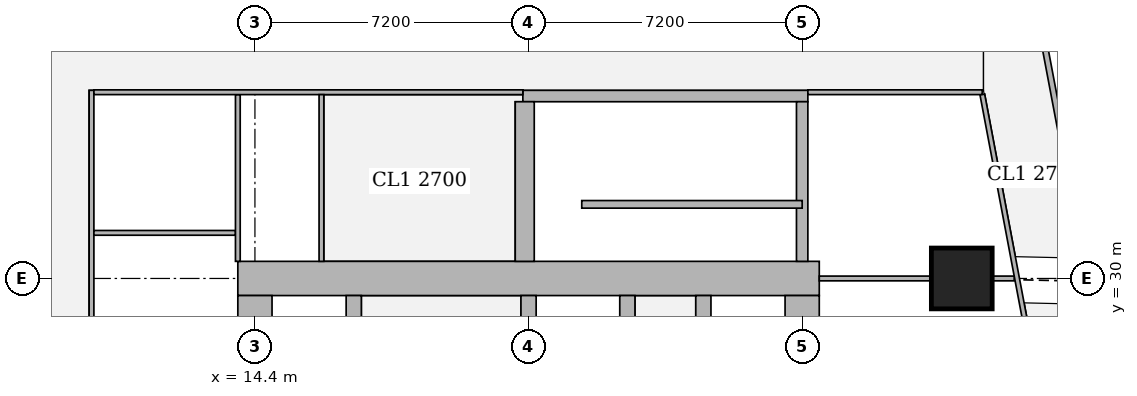
"""IFC4 building model, lengths in metres.
Left out: names, types, materials, properties, quantities, classifications, styles, units other than length and angle.
Written with IfcOpenShell. Run it as: python <this file> out.ifc"""

import sys

from ifc_helpers import new_model, si_unit, direction, frame, frame_2d, origin, origin_2d, place, context, subcontext, project, spatial, rectangle, extrude, element, fill, save


model = new_model("IFC4")
c1 = context("Model", 3, precision=1e-05, world=origin(), true_north=direction((0.0, 1.0)))
c2 = subcontext(c1, "Body", "Model", "MODEL_VIEW")
j1 = project(units=[si_unit("LENGTHUNIT", "METRE"), si_unit("PLANEANGLEUNIT", "RADIAN")], contexts=[c1])
p1 = place(None, origin())
s1 = spatial("IfcSite", under=j1, at=p1, CompositionType="ELEMENT")
p2 = place(p1, origin())
s2 = spatial("IfcBuilding", under=s1, at=p2, CompositionType="ELEMENT")
p3 = place(p2, frame((0.0, 0.0, 100.4)))
s3 = spatial("IfcBuildingStorey", under=s2, at=p3, CompositionType="ELEMENT", Elevation=100.4)
p4 = place(p3, frame((33.0, 30.0, 0.0), z_axis=(0.0, 0.0, 1.0), x_axis=(1.0, 0.0, 0.0)))
e1 = element("IfcColumn", 1, at=p4, inside=s3, PredefinedType="COLUMN", context=c2, shape_type="SweptSolid", body=[
    extrude(rectangle(XDim=1.6, YDim=1.6, at=origin_2d()), origin(), (0.0, 0.0, 1.0), 3.75),
])
p5 = place(p3, frame((13.95, 30.0, 0.0), z_axis=(0.0, 0.0, 1.0), x_axis=(1.0, 0.0, 0.0)))
e2 = element("IfcWall", 2, at=p5, inside=s3, PredefinedType="SHEAR", context=c2, shape_type="SweptSolid", body=[
    extrude(rectangle(XDim=15.3, YDim=0.9, at=frame_2d((7.65, 0.0))), origin(), (0.0, 0.0, 1.0), 3.75),
])
p6 = place(p5, frame((4.45, 0.0, 0.0)))
e3 = element("IfcOpeningElement", 3, at=p6, cuts=e2, PredefinedType="OPENING", context=c2, shape_type="SweptSolid", body=[
    extrude(rectangle(XDim=1.8, YDim=2.1, at=frame_2d((0.9, 1.05))), frame((0.0, 0.46, 0.0), z_axis=(0.0, -1.0, 0.0), x_axis=(1.0, 0.0, 0.0)), (0.0, 0.0, 1.0), 0.92),
])
p7 = place(p5, frame((10.7, 0.0, 0.0)))
e4 = element("IfcOpeningElement", 4, at=p7, cuts=e2, PredefinedType="OPENING", context=c2, shape_type="SweptSolid", body=[
    extrude(rectangle(XDim=1.1, YDim=2.1, at=frame_2d((0.55, 1.05))), frame((0.0, 0.46, 0.0), z_axis=(0.0, -1.0, 0.0), x_axis=(1.0, 0.0, 0.0)), (0.0, 0.0, 1.0), 0.92),
])
for number, where, z_axis, x_axis in (
    (5, (14.4, 15.45, 0.0), (0.0, 0.0, 1.0), (0.0, 1.0, 0.0)),
    (6, (28.8, 15.45, 0.0), (0.0, 0.0, 1.0), (0.0, 1.0, 0.0)),
):
    element("IfcWall", number, at=place(p3, frame(where, z_axis=z_axis, x_axis=x_axis)), inside=s3, PredefinedType="SHEAR", context=c2, shape_type="SweptSolid", body=[
        extrude(rectangle(XDim=14.1, YDim=0.9, at=frame_2d((7.05, 0.0))), origin(), (0.0, 0.0, 1.0), 3.75),
    ])
p8 = place(p3, frame((17.0, 15.45, 0.0), z_axis=(0.0, 0.0, 1.0), x_axis=(0.0, 1.0, 0.0)))
e7 = element("IfcWall", 7, at=p8, inside=s3, PredefinedType="SHEAR", context=c2, shape_type="SweptSolid", body=[
    extrude(rectangle(XDim=14.1, YDim=0.4, at=frame_2d((7.05, 0.0))), origin(), (0.0, 0.0, 1.0), 3.75),
])
p9 = place(p8, frame((0.875, 0.0, 0.0)))
e8 = element("IfcOpeningElement", 8, at=p9, cuts=e7, PredefinedType="OPENING", context=c2, shape_type="SweptSolid", body=[
    extrude(rectangle(XDim=1.1, YDim=2.1, at=frame_2d((0.55, 1.05))), frame((0.0, 0.21, 0.0), z_axis=(0.0, -1.0, 0.0), x_axis=(1.0, 0.0, 0.0)), (0.0, 0.0, 1.0), 0.42),
])
p10 = place(p8, frame((4.625, 0.0, 0.0)))
e9 = element("IfcOpeningElement", 9, at=p10, cuts=e7, PredefinedType="OPENING", context=c2, shape_type="SweptSolid", body=[
    extrude(rectangle(XDim=1.1, YDim=2.1, at=frame_2d((0.55, 1.05))), frame((0.0, 0.21, 0.0), z_axis=(0.0, -1.0, 0.0), x_axis=(1.0, 0.0, 0.0)), (0.0, 0.0, 1.0), 0.42),
])
p11 = place(p8, frame((8.375, 0.0, 0.0)))
e10 = element("IfcOpeningElement", 10, at=p11, cuts=e7, PredefinedType="OPENING", context=c2, shape_type="SweptSolid", body=[
    extrude(rectangle(XDim=1.1, YDim=2.1, at=frame_2d((0.55, 1.05))), frame((0.0, 0.21, 0.0), z_axis=(0.0, -1.0, 0.0), x_axis=(1.0, 0.0, 0.0)), (0.0, 0.0, 1.0), 0.42),
])
p12 = place(p8, frame((12.125, 0.0, 0.0)))
e11 = element("IfcOpeningElement", 11, at=p12, cuts=e7, PredefinedType="OPENING", context=c2, shape_type="SweptSolid", body=[
    extrude(rectangle(XDim=1.1, YDim=2.1, at=frame_2d((0.55, 1.05))), frame((0.0, 0.21, 0.0), z_axis=(0.0, -1.0, 0.0), x_axis=(1.0, 0.0, 0.0)), (0.0, 0.0, 1.0), 0.42),
])
for number, where, z_axis, x_axis in (
    (12, (21.6, 15.45, 0.0), (0.0, 0.0, 1.0), (0.0, 1.0, 0.0)),
    (13, (24.2, 15.45, 0.0), (0.0, 0.0, 1.0), (0.0, 1.0, 0.0)),
):
    element("IfcWall", number, at=place(p3, frame(where, z_axis=z_axis, x_axis=x_axis)), inside=s3, PredefinedType="SHEAR", context=c2, shape_type="SweptSolid", body=[
        extrude(rectangle(XDim=14.1, YDim=0.4, at=frame_2d((7.05, 0.0))), origin(), (0.0, 0.0, 1.0), 3.75),
    ])
p13 = place(p3, frame((26.2, 26.45, 0.0), z_axis=(0.0, 0.0, 1.0), x_axis=(0.0, 1.0, 0.0)))
e14 = element("IfcWall", 14, at=p13, inside=s3, PredefinedType="SHEAR", context=c2, shape_type="SweptSolid", body=[
    extrude(rectangle(XDim=3.1, YDim=0.4, at=frame_2d((1.55, 0.0))), origin(), (0.0, 0.0, 1.0), 3.75),
])
p14 = place(p13, frame((1.075, 0.0, 0.0)))
e15 = element("IfcOpeningElement", 15, at=p14, cuts=e14, PredefinedType="OPENING", context=c2, shape_type="SweptSolid", body=[
    extrude(rectangle(XDim=1.2, YDim=2.1, at=frame_2d((0.6, 1.05))), frame((0.0, 0.21, 0.0), z_axis=(0.0, -1.0, 0.0), x_axis=(1.0, 0.0, 0.0)), (0.0, 0.0, 1.0), 0.42),
])
p15 = place(p3, frame((21.45, 34.8, 0.0), z_axis=(0.0, 0.0, 1.0), x_axis=(1.0, 0.0, 0.0)))
e16 = element("IfcWall", 16, at=p15, inside=s3, PredefinedType="SHEAR", context=c2, shape_type="SweptSolid", body=[
    extrude(rectangle(XDim=7.5, YDim=0.3, at=frame_2d((3.75, 0.0))), origin(), (0.0, 0.0, 1.0), 3.75),
])
p16 = place(p15, frame((0.5, 0.0, 0.0)))
e17 = element("IfcOpeningElement", 17, at=p16, cuts=e16, PredefinedType="OPENING", context=c2, shape_type="SweptSolid", body=[
    extrude(rectangle(XDim=1.1, YDim=2.1, at=frame_2d((0.55, 1.05))), frame((0.0, 0.16, 0.0), z_axis=(0.0, -1.0, 0.0), x_axis=(1.0, 0.0, 0.0)), (0.0, 0.0, 1.0), 0.32),
])
p17 = place(p3, frame((21.5, 30.45, 0.0), z_axis=(0.0, 0.0, 1.0), x_axis=(0.0, 1.0, 0.0)))
e18 = element("IfcWall", 18, at=p17, inside=s3, PredefinedType="SHEAR", context=c2, shape_type="SweptSolid", body=[
    extrude(rectangle(XDim=4.2, YDim=0.5, at=frame_2d((2.1, 0.0))), origin(), (0.0, 0.0, 1.0), 3.75),
])
p18 = place(p3, frame((28.8, 30.45, 0.0), z_axis=(0.0, 0.0, 1.0), x_axis=(0.0, 1.0, 0.0)))
e19 = element("IfcWall", 19, at=p18, inside=s3, PredefinedType="SHEAR", context=c2, shape_type="SweptSolid", body=[
    extrude(rectangle(XDim=4.2, YDim=0.3, at=frame_2d((2.1, 0.0))), origin(), (0.0, 0.0, 1.0), 3.75),
])
p19 = place(p3, frame((33.382, 45.65, 0.0), z_axis=(0.0, 0.0, 1.0), x_axis=(0.185593544777, -0.982626600565, 0.0)))
e20 = element("IfcWall", 20, at=p19, inside=s3, PredefinedType="SOLIDWALL", context=c2, shape_type="SweptSolid", body=[
    extrude(rectangle(XDim=47.118, YDim=0.15, at=frame_2d((23.559, 0.0))), origin(), (0.0, 0.0, 1.0), 2.2),
])
p20 = place(p19, frame((10.662, 0.0, 0.0)))
e21 = element("IfcOpeningElement", 21, at=p20, cuts=e20, PredefinedType="OPENING", context=c2, shape_type="SweptSolid", body=[
    extrude(rectangle(XDim=1.0, YDim=2.1, at=frame_2d((0.5, 1.05))), frame((0.0, 0.085, 0.0), z_axis=(0.0, -1.0, 0.0), x_axis=(1.0, 0.0, 0.0)), (0.0, 0.0, 1.0), 0.17),
])
p21 = place(p19, frame((15.237, 0.0, 0.0)))
e22 = element("IfcOpeningElement", 22, at=p21, cuts=e20, PredefinedType="OPENING", context=c2, shape_type="SweptSolid", body=[
    extrude(rectangle(XDim=1.0, YDim=2.1, at=frame_2d((0.5, 1.05))), frame((0.0, 0.085, 0.0), z_axis=(0.0, -1.0, 0.0), x_axis=(1.0, 0.0, 0.0)), (0.0, 0.0, 1.0), 0.17),
])
p22 = place(p19, frame((27.341, 0.0, 0.0)))
e23 = element("IfcOpeningElement", 23, at=p22, cuts=e20, PredefinedType="OPENING", context=c2, shape_type="SweptSolid", body=[
    extrude(rectangle(XDim=1.0, YDim=2.1, at=frame_2d((0.5, 1.05))), frame((0.0, 0.085, 0.0), z_axis=(0.0, -1.0, 0.0), x_axis=(1.0, 0.0, 0.0)), (0.0, 0.0, 1.0), 0.17),
])
p23 = place(p19, frame((33.833, 0.0, 0.0)))
e24 = element("IfcOpeningElement", 24, at=p23, cuts=e20, PredefinedType="OPENING", context=c2, shape_type="SweptSolid", body=[
    extrude(rectangle(XDim=1.0, YDim=2.1, at=frame_2d((0.5, 1.05))), frame((0.0, 0.085, 0.0), z_axis=(0.0, -1.0, 0.0), x_axis=(1.0, 0.0, 0.0)), (0.0, 0.0, 1.0), 0.17),
])
p24 = place(p3, frame((10.1, 28.5, 0.0), z_axis=(0.0, 0.0, 1.0), x_axis=(0.0, 1.0, 0.0)))
e25 = element("IfcWall", 25, at=p24, inside=s3, PredefinedType="PARTITIONING", context=c2, shape_type="SweptSolid", body=[
    extrude(rectangle(XDim=6.45, YDim=0.125, at=frame_2d((3.225, 0.0))), origin(), (0.0, 0.0, 1.0), 3.5),
])
p25 = place(p24, frame((0.85, 0.0, 0.0)))
e26 = element("IfcOpeningElement", 26, at=p25, cuts=e25, PredefinedType="OPENING", context=c2, shape_type="SweptSolid", body=[
    extrude(rectangle(XDim=1.0, YDim=2.1, at=frame_2d((0.5, 1.05))), frame((0.0, 0.073, 0.0), z_axis=(0.0, -1.0, 0.0), x_axis=(1.0, 0.0, 0.0)), (0.0, 0.0, 1.0), 0.145),
])
p26 = place(p24, frame((4.075, 0.0, 0.0)))
e27 = element("IfcOpeningElement", 27, at=p26, cuts=e25, PredefinedType="OPENING", context=c2, shape_type="SweptSolid", body=[
    extrude(rectangle(XDim=1.0, YDim=2.1, at=frame_2d((0.5, 1.05))), frame((0.0, 0.073, 0.0), z_axis=(0.0, -1.0, 0.0), x_axis=(1.0, 0.0, 0.0)), (0.0, 0.0, 1.0), 0.145),
])
p27 = place(p3, frame((10.163, 31.2, 0.0), z_axis=(0.0, 0.0, 1.0), x_axis=(1.0, 0.0, 0.0)))
e28 = element("IfcWall", 28, at=p27, inside=s3, PredefinedType="PARTITIONING", context=c2, shape_type="SweptSolid", body=[
    extrude(rectangle(XDim=3.725, YDim=0.125, at=frame_2d((1.862, 0.0))), origin(), (0.0, 0.0, 1.0), 3.5),
])
p28 = place(p3, frame((13.95, 30.45, 0.0), z_axis=(0.0, 0.0, 1.0), x_axis=(0.0, 1.0, 0.0)))
e29 = element("IfcWall", 29, at=p28, inside=s3, PredefinedType="PARTITIONING", context=c2, shape_type="SweptSolid", body=[
    extrude(rectangle(XDim=4.387, YDim=0.125, at=frame_2d((2.193, 0.0))), origin(), (0.0, 0.0, 1.0), 3.5),
])
p29 = place(p3, frame((10.163, 34.9, 0.0), z_axis=(0.0, 0.0, 1.0), x_axis=(1.0, 0.0, 0.0)))
e30 = element("IfcWall", 30, at=p29, inside=s3, PredefinedType="PARTITIONING", context=c2, shape_type="SweptSolid", body=[
    extrude(rectangle(XDim=11.287, YDim=0.125, at=frame_2d((5.644, 0.0))), origin(), (0.0, 0.0, 1.0), 3.5),
])
p30 = place(p29, frame((7.737, 0.0, 0.0)))
e31 = element("IfcOpeningElement", 31, at=p30, cuts=e30, PredefinedType="OPENING", context=c2, shape_type="SweptSolid", body=[
    extrude(rectangle(XDim=1.8, YDim=2.1, at=frame_2d((0.9, 1.05))), frame((0.0, 0.073, 0.0), z_axis=(0.0, -1.0, 0.0), x_axis=(1.0, 0.0, 0.0)), (0.0, 0.0, 1.0), 0.145),
])
p31 = place(p3, frame((16.15, 30.45, 0.0), z_axis=(0.0, 0.0, 1.0), x_axis=(0.0, 1.0, 0.0)))
e32 = element("IfcWall", 32, at=p31, inside=s3, PredefinedType="PARTITIONING", context=c2, shape_type="SweptSolid", body=[
    extrude(rectangle(XDim=4.387, YDim=0.125, at=frame_2d((2.193, 0.0))), origin(), (0.0, 0.0, 1.0), 3.5),
])
p32 = place(p31, frame((1.75, 0.0, 0.0)))
e33 = element("IfcOpeningElement", 33, at=p32, cuts=e32, PredefinedType="OPENING", context=c2, shape_type="SweptSolid", body=[
    extrude(rectangle(XDim=1.0, YDim=2.1, at=frame_2d((0.5, 1.05))), frame((0.0, 0.073, 0.0), z_axis=(0.0, -1.0, 0.0), x_axis=(1.0, 0.0, 0.0)), (0.0, 0.0, 1.0), 0.145),
])
p33 = place(p3, frame((28.95, 34.9, 0.0), z_axis=(0.0, 0.0, 1.0), x_axis=(1.0, 0.0, 0.0)))
e34 = element("IfcWall", 34, at=p33, inside=s3, PredefinedType="PARTITIONING", context=c2, shape_type="SweptSolid", body=[
    extrude(rectangle(XDim=4.588, YDim=0.125, at=frame_2d((2.294, 0.0))), origin(), (0.0, 0.0, 1.0), 3.5),
])
p34 = place(p3, frame((38.202, 10.163, 0.0), z_axis=(0.0, 0.0, 1.0), x_axis=(-0.185610321132, 0.982623431783, 0.0)))
e35 = element("IfcWall", 35, at=p34, inside=s3, PredefinedType="PARTITIONING", context=c2, shape_type="SweptSolid", body=[
    extrude(rectangle(XDim=25.111, YDim=0.125, at=frame_2d((12.556, 0.0))), origin(), (0.0, 0.0, 1.0), 2.5),
])
p35 = place(p34, frame((0.708, 0.0, 0.0)))
e36 = element("IfcOpeningElement", 36, at=p35, cuts=e35, PredefinedType="OPENING", context=c2, shape_type="SweptSolid", body=[
    extrude(rectangle(XDim=1.0, YDim=2.1, at=frame_2d((0.5, 1.05))), frame((0.0, 0.073, 0.0), z_axis=(0.0, -1.0, 0.0), x_axis=(1.0, 0.0, 0.0)), (0.0, 0.0, 1.0), 0.145),
])
p36 = place(p34, frame((6.0, 0.0, 0.0)))
e37 = element("IfcOpeningElement", 37, at=p36, cuts=e35, PredefinedType="OPENING", context=c2, shape_type="SweptSolid", body=[
    extrude(rectangle(XDim=1.0, YDim=2.1, at=frame_2d((0.5, 1.05))), frame((0.0, 0.073, 0.0), z_axis=(0.0, -1.0, 0.0), x_axis=(1.0, 0.0, 0.0)), (0.0, 0.0, 1.0), 0.145),
])
p37 = place(p34, frame((13.378, 0.0, 0.0)))
e38 = element("IfcOpeningElement", 38, at=p37, cuts=e35, PredefinedType="OPENING", context=c2, shape_type="SweptSolid", body=[
    extrude(rectangle(XDim=1.0, YDim=2.1, at=frame_2d((0.5, 1.05))), frame((0.0, 0.073, 0.0), z_axis=(0.0, -1.0, 0.0), x_axis=(1.0, 0.0, 0.0)), (0.0, 0.0, 1.0), 0.145),
])
p38 = place(p34, frame((21.25, 0.0, 0.0)))
e39 = element("IfcOpeningElement", 39, at=p38, cuts=e35, PredefinedType="OPENING", context=c2, shape_type="SweptSolid", body=[
    extrude(rectangle(XDim=1.0, YDim=2.1, at=frame_2d((0.5, 1.05))), frame((0.0, 0.073, 0.0), z_axis=(0.0, -1.0, 0.0), x_axis=(1.0, 0.0, 0.0)), (0.0, 0.0, 1.0), 0.145),
])
p39 = place(p3, frame((29.25, 30.0, 0.0), z_axis=(0.0, 0.0, 1.0), x_axis=(1.0, 0.0, 0.0)))
e40 = element("IfcWall", 40, at=p39, inside=s3, PredefinedType="PARTITIONING", context=c2, shape_type="SweptSolid", body=[
    extrude(rectangle(XDim=2.949, YDim=0.125, at=frame_2d((1.475, 0.0))), origin(), (0.0, 0.0, 1.0), 3.5),
])
p40 = place(p3, frame((33.801, 30.0, 0.0), z_axis=(0.0, 0.0, 1.0), x_axis=(1.0, 0.0, 0.0)))
e41 = element("IfcWall", 41, at=p40, inside=s3, PredefinedType="PARTITIONING", context=c2, shape_type="SweptSolid", body=[
    extrude(rectangle(XDim=0.578, YDim=0.125, at=frame_2d((0.289, 0.0))), origin(), (0.0, 0.0, 1.0), 2.5),
])
p41 = place(p3, frame((23.0, 31.95, 0.0), z_axis=(0.0, 0.0, 1.0), x_axis=(1.0, 0.0, 0.0)))
e42 = element("IfcWall", 42, at=p41, inside=s3, PredefinedType="SHEAR", context=c2, shape_type="SweptSolid", body=[
    extrude(rectangle(XDim=5.8, YDim=0.2, at=frame_2d((2.9, 0.0))), origin(), (0.0, 0.0, 1.0), 3.75),
])
p42 = place(p20, origin())
e43 = element("IfcDoor", 43, at=p42, inside=s3, OperationType="SINGLE_SWING_RIGHT", PredefinedType="DOOR", context=c2, shape_type="SweptSolid", body=[
    extrude(rectangle(XDim=1.0, YDim=2.1, at=frame_2d((0.5, 1.05))), frame((0.0, 0.025, 0.0), z_axis=(0.0, -1.0, 0.0), x_axis=(1.0, 0.0, 0.0)), (0.0, 0.0, 1.0), 0.05),
])
fill(e21, e43)
p43 = place(p25, origin())
e44 = element("IfcDoor", 44, at=p43, inside=s3, OperationType="SINGLE_SWING_RIGHT", PredefinedType="DOOR", context=c2, shape_type="SweptSolid", body=[
    extrude(rectangle(XDim=1.0, YDim=2.1, at=frame_2d((0.5, 1.05))), frame((0.0, 0.025, 0.0), z_axis=(0.0, -1.0, 0.0), x_axis=(1.0, 0.0, 0.0)), (0.0, 0.0, 1.0), 0.05),
])
fill(e26, e44)
p44 = place(p26, origin())
e45 = element("IfcDoor", 45, at=p44, inside=s3, OperationType="SINGLE_SWING_LEFT", PredefinedType="DOOR", context=c2, shape_type="SweptSolid", body=[
    extrude(rectangle(XDim=1.0, YDim=2.1, at=frame_2d((0.5, 1.05))), frame((0.0, 0.025, 0.0), z_axis=(0.0, -1.0, 0.0), x_axis=(1.0, 0.0, 0.0)), (0.0, 0.0, 1.0), 0.05),
])
fill(e27, e45)
p45 = place(p32, origin())
e46 = element("IfcDoor", 46, at=p45, inside=s3, OperationType="SINGLE_SWING_RIGHT", PredefinedType="DOOR", context=c2, shape_type="SweptSolid", body=[
    extrude(rectangle(XDim=1.0, YDim=2.1, at=frame_2d((0.5, 1.05))), frame((0.0, 0.025, 0.0), z_axis=(0.0, -1.0, 0.0), x_axis=(1.0, 0.0, 0.0)), (0.0, 0.0, 1.0), 0.05),
])
fill(e33, e46)
p46 = place(p30, origin())
e47 = element("IfcDoor", 47, at=p46, inside=s3, OperationType="DOUBLE_DOOR_SINGLE_SWING", PredefinedType="DOOR", context=c2, shape_type="SweptSolid", body=[
    extrude(rectangle(XDim=1.8, YDim=2.1, at=frame_2d((0.9, 1.05))), frame((0.0, 0.025, 0.0), z_axis=(0.0, -1.0, 0.0), x_axis=(1.0, 0.0, 0.0)), (0.0, 0.0, 1.0), 0.05),
])
fill(e31, e47)
p47 = place(p38, origin())
e48 = element("IfcDoor", 48, at=p47, inside=s3, OperationType="SINGLE_SWING_LEFT", PredefinedType="DOOR", context=c2, shape_type="SweptSolid", body=[
    extrude(rectangle(XDim=1.0, YDim=2.1, at=frame_2d((0.5, 1.05))), frame((0.0, 0.025, 0.0), z_axis=(0.0, -1.0, 0.0), x_axis=(1.0, 0.0, 0.0)), (0.0, 0.0, 1.0), 0.05),
])
fill(e39, e48)
p48 = place(p6, origin())
e49 = element("IfcDoor", 49, at=p48, inside=s3, OperationType="DOUBLE_DOOR_SINGLE_SWING", PredefinedType="DOOR", context=c2, shape_type="SweptSolid", body=[
    extrude(rectangle(XDim=1.8, YDim=2.1, at=frame_2d((0.9, 1.05))), frame((0.0, 0.025, 0.0), z_axis=(0.0, -1.0, 0.0), x_axis=(1.0, 0.0, 0.0)), (0.0, 0.0, 1.0), 0.05),
])
fill(e3, e49)
p49 = place(p7, origin())
e50 = element("IfcDoor", 50, at=p49, inside=s3, OperationType="SINGLE_SWING_LEFT", PredefinedType="DOOR", context=c2, shape_type="SweptSolid", body=[
    extrude(rectangle(XDim=1.1, YDim=2.1, at=frame_2d((0.55, 1.05))), frame((0.0, 0.025, 0.0), z_axis=(0.0, -1.0, 0.0), x_axis=(1.0, 0.0, 0.0)), (0.0, 0.0, 1.0), 0.05),
])
fill(e4, e50)
p50 = place(p16, origin())
e51 = element("IfcDoor", 51, at=p50, inside=s3, OperationType="SINGLE_SWING_RIGHT", PredefinedType="DOOR", context=c2, shape_type="SweptSolid", body=[
    extrude(rectangle(XDim=1.1, YDim=2.1, at=frame_2d((0.55, 1.05))), frame((0.0, 0.025, 0.0), z_axis=(0.0, -1.0, 0.0), x_axis=(1.0, 0.0, 0.0)), (0.0, 0.0, 1.0), 0.05),
])
fill(e17, e51)
save(model, sys.argv[1])
